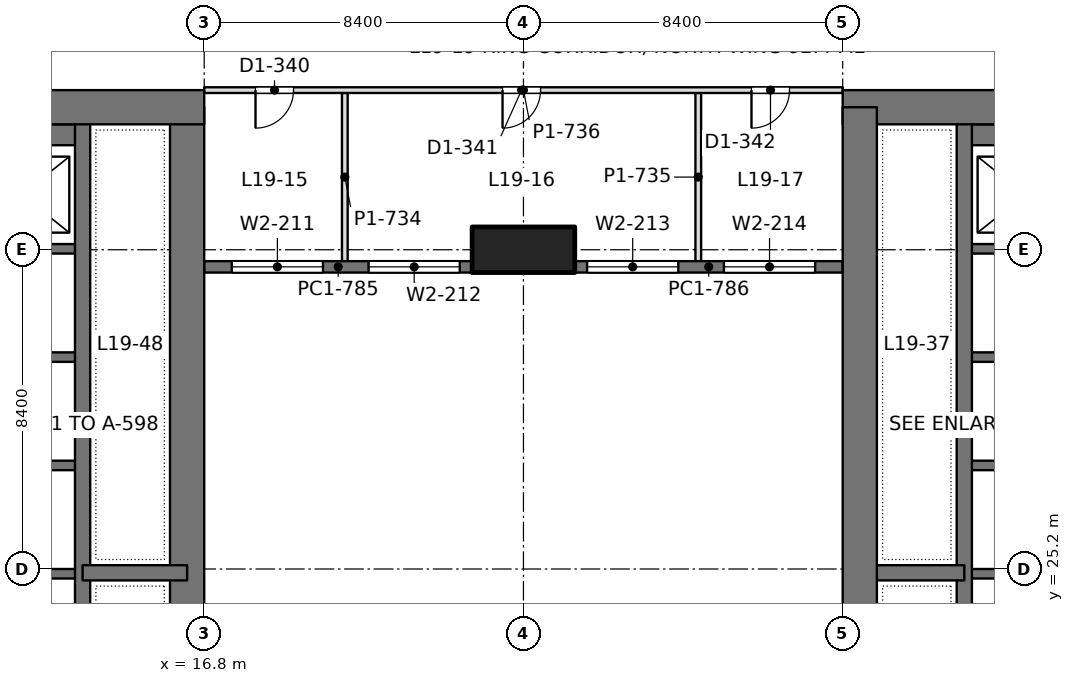
"""IFC4 building model, lengths in metres.
Left out: names, types, materials, properties, quantities, classifications, styles, units other than length and angle.
Written with IfcOpenShell. Run it as: python <this file> out.ifc"""

import sys

from ifc_helpers import new_model, si_unit, direction, frame, frame_2d, origin, origin_2d, place, context, subcontext, project, spatial, rectangle, extrude, element, fill, save


model = new_model("IFC4")
c1 = context("Model", 3, precision=1e-05, world=origin(), true_north=direction((0.0, 1.0)))
c2 = subcontext(c1, "Body", "Model", "MODEL_VIEW")
j1 = project(units=[si_unit("LENGTHUNIT", "METRE"), si_unit("PLANEANGLEUNIT", "RADIAN")], contexts=[c1])
p1 = place(None, origin())
s1 = spatial("IfcSite", under=j1, at=p1, CompositionType="ELEMENT")
p2 = place(p1, origin())
s2 = spatial("IfcBuilding", under=s1, at=p2, CompositionType="ELEMENT")
p3 = place(p2, frame((0.0, 0.0, 86.4)))
s3 = spatial("IfcBuildingStorey", under=s2, at=p3, CompositionType="ELEMENT", Elevation=86.4)
p4 = place(p3, frame((25.2, 33.6, 0.0), z_axis=(0.0, 0.0, 1.0), x_axis=(1.0, 0.0, 0.0)))
e1 = element("IfcColumn", 1, at=p4, inside=s3, PredefinedType="COLUMN", context=c2, shape_type="SweptSolid", body=[
    extrude(rectangle(XDim=2.7, YDim=1.2, at=origin_2d()), origin(), (0.0, 0.0, 1.0), 4.5),
])
p5 = place(p3, frame((-1.2, 37.35, 0.0), z_axis=(0.0, 0.0, 1.0), x_axis=(1.0, 0.0, 0.0)))
e2 = element("IfcWall", 2, at=p5, inside=s3, PredefinedType="SHEAR", context=c2, shape_type="SweptSolid", body=[
    extrude(rectangle(XDim=18.0, YDim=0.9, at=frame_2d((9.0, 0.0))), origin(), (0.0, 0.0, 1.0), 4.5),
])
p6 = place(p5, frame((8.95, 0.0, 0.0)))
e3 = element("IfcOpeningElement", 3, at=p6, cuts=e2, PredefinedType="OPENING", context=c2, shape_type="SweptSolid", body=[
    extrude(rectangle(XDim=1.8, YDim=2.4, at=frame_2d((0.9, 1.2))), frame((0.0, 0.46, 0.0), z_axis=(0.0, -1.0, 0.0), x_axis=(1.0, 0.0, 0.0)), (0.0, 0.0, 1.0), 0.92),
])
p7 = place(p3, frame((16.35, 13.05, 0.0), z_axis=(0.0, 0.0, 1.0), x_axis=(0.0, 1.0, 0.0)))
e4 = element("IfcWall", 4, at=p7, inside=s3, PredefinedType="SHEAR", context=c2, shape_type="SweptSolid", body=[
    extrude(rectangle(XDim=24.3, YDim=0.9, at=frame_2d((12.15, 0.0))), origin(), (0.0, 0.0, 1.0), 4.5),
])
p8 = place(p3, frame((13.6, 13.05, 0.0), z_axis=(0.0, 0.0, 1.0), x_axis=(0.0, 1.0, 0.0)))
e5 = element("IfcWall", 5, at=p8, inside=s3, PredefinedType="SHEAR", context=c2, shape_type="SweptSolid", body=[
    extrude(rectangle(XDim=24.3, YDim=0.4, at=frame_2d((12.15, 0.0))), origin(), (0.0, 0.0, 1.0), 4.5),
])
p9 = place(p3, frame((13.6, 25.1, 0.0), z_axis=(0.0, 0.0, 1.0), x_axis=(1.0, 0.0, 0.0)))
e6 = element("IfcWall", 6, at=p9, inside=s3, PredefinedType="SHEAR", context=c2, shape_type="SweptSolid", body=[
    extrude(rectangle(XDim=2.75, YDim=0.4, at=frame_2d((1.375, 0.0))), origin(), (0.0, 0.0, 1.0), 4.5),
])
for number, where, z_axis, x_axis in (
    (7, (10.4, 25.075, 0.0), (0.0, 0.0, 1.0), (1.0, 0.0, 0.0)),
    (8, (10.4, 27.925, 0.0), (0.0, 0.0, 1.0), (1.0, 0.0, 0.0)),
    (9, (10.4, 30.775, 0.0), (0.0, 0.0, 1.0), (1.0, 0.0, 0.0)),
    (10, (10.4, 33.625, 0.0), (0.0, 0.0, 1.0), (1.0, 0.0, 0.0)),
):
    element("IfcWall", number, at=place(p3, frame(where, z_axis=z_axis, x_axis=x_axis)), inside=s3, PredefinedType="SHEAR", context=c2, shape_type="SweptSolid", body=[
        extrude(rectangle(XDim=3.2, YDim=0.25, at=frame_2d((1.6, 0.0))), origin(), (0.0, 0.0, 1.0), 4.5),
    ])
p10 = place(p3, frame((10.4, 36.625, 0.0), z_axis=(0.0, 0.0, 1.0), x_axis=(1.0, 0.0, 0.0)))
e11 = element("IfcWall", 11, at=p10, inside=s3, PredefinedType="SHEAR", context=c2, shape_type="SweptSolid", body=[
    extrude(rectangle(XDim=3.2, YDim=0.55, at=frame_2d((1.6, 0.0))), origin(), (0.0, 0.0, 1.0), 4.5),
])
p11 = place(p3, frame((33.6, 37.35, 0.0), z_axis=(0.0, 0.0, 1.0), x_axis=(1.0, 0.0, 0.0)))
e12 = element("IfcWall", 12, at=p11, inside=s3, PredefinedType="SHEAR", context=c2, shape_type="SweptSolid", body=[
    extrude(rectangle(XDim=18.0, YDim=0.9, at=frame_2d((9.0, 0.0))), origin(), (0.0, 0.0, 1.0), 4.5),
])
p12 = place(p11, frame((7.25, 0.0, 0.0)))
e13 = element("IfcOpeningElement", 13, at=p12, cuts=e12, PredefinedType="OPENING", context=c2, shape_type="SweptSolid", body=[
    extrude(rectangle(XDim=1.8, YDim=2.4, at=frame_2d((0.9, 1.2))), frame((0.0, 0.46, 0.0), z_axis=(0.0, -1.0, 0.0), x_axis=(1.0, 0.0, 0.0)), (0.0, 0.0, 1.0), 0.92),
])
p13 = place(p3, frame((34.05, 13.05, 0.0), z_axis=(0.0, 0.0, 1.0), x_axis=(0.0, 1.0, 0.0)))
e14 = element("IfcWall", 14, at=p13, inside=s3, PredefinedType="SHEAR", context=c2, shape_type="SweptSolid", body=[
    extrude(rectangle(XDim=24.3, YDim=0.9, at=frame_2d((12.15, 0.0))), origin(), (0.0, 0.0, 1.0), 4.5),
])
p14 = place(p3, frame((36.8, 13.05, 0.0), z_axis=(0.0, 0.0, 1.0), x_axis=(0.0, 1.0, 0.0)))
e15 = element("IfcWall", 15, at=p14, inside=s3, PredefinedType="SHEAR", context=c2, shape_type="SweptSolid", body=[
    extrude(rectangle(XDim=24.3, YDim=0.4, at=frame_2d((12.15, 0.0))), origin(), (0.0, 0.0, 1.0), 4.5),
])
p15 = place(p3, frame((36.8, 25.1, 0.0), z_axis=(0.0, 0.0, 1.0), x_axis=(-1.0, 0.0, 0.0)))
e16 = element("IfcWall", 16, at=p15, inside=s3, PredefinedType="SHEAR", context=c2, shape_type="SweptSolid", body=[
    extrude(rectangle(XDim=2.75, YDim=0.4, at=frame_2d((1.375, 0.0))), origin(), (0.0, 0.0, 1.0), 4.5),
])
for number, where, z_axis, x_axis in (
    (17, (40.0, 25.075, 0.0), (0.0, 0.0, 1.0), (-1.0, 0.0, 0.0)),
    (18, (40.0, 27.925, 0.0), (0.0, 0.0, 1.0), (-1.0, 0.0, 0.0)),
    (19, (40.0, 30.775, 0.0), (0.0, 0.0, 1.0), (-1.0, 0.0, 0.0)),
    (20, (40.0, 33.625, 0.0), (0.0, 0.0, 1.0), (-1.0, 0.0, 0.0)),
):
    element("IfcWall", number, at=place(p3, frame(where, z_axis=z_axis, x_axis=x_axis)), inside=s3, PredefinedType="SHEAR", context=c2, shape_type="SweptSolid", body=[
        extrude(rectangle(XDim=3.2, YDim=0.25, at=frame_2d((1.6, 0.0))), origin(), (0.0, 0.0, 1.0), 4.5),
    ])
p16 = place(p3, frame((40.0, 36.625, 0.0), z_axis=(0.0, 0.0, 1.0), x_axis=(-1.0, 0.0, 0.0)))
e21 = element("IfcWall", 21, at=p16, inside=s3, PredefinedType="SHEAR", context=c2, shape_type="SweptSolid", body=[
    extrude(rectangle(XDim=3.2, YDim=0.55, at=frame_2d((1.6, 0.0))), origin(), (0.0, 0.0, 1.0), 4.5),
])
p17 = place(p3, frame((16.8, 33.15, 0.0), z_axis=(0.0, 0.0, 1.0), x_axis=(1.0, 0.0, 0.0)))
e22 = element("IfcWall", 22, at=p17, inside=s3, PredefinedType="SOLIDWALL", context=c2, shape_type="SweptSolid", body=[
    extrude(rectangle(XDim=7.05, YDim=0.3, at=frame_2d((3.525, 0.0))), origin(), (0.0, 0.0, 1.0), 4.3),
])
p18 = place(p17, frame((0.725, 0.0, 0.9)))
e23 = element("IfcOpeningElement", 23, at=p18, cuts=e22, PredefinedType="OPENING", context=c2, shape_type="SweptSolid", body=[
    extrude(rectangle(XDim=2.4, YDim=1.9, at=frame_2d((1.2, 0.95))), frame((0.0, 0.16, 0.0), z_axis=(0.0, -1.0, 0.0), x_axis=(1.0, 0.0, 0.0)), (0.0, 0.0, 1.0), 0.32),
])
p19 = place(p17, frame((4.325, 0.0, 0.9)))
e24 = element("IfcOpeningElement", 24, at=p19, cuts=e22, PredefinedType="OPENING", context=c2, shape_type="SweptSolid", body=[
    extrude(rectangle(XDim=2.4, YDim=1.9, at=frame_2d((1.2, 0.95))), frame((0.0, 0.16, 0.0), z_axis=(0.0, -1.0, 0.0), x_axis=(1.0, 0.0, 0.0)), (0.0, 0.0, 1.0), 0.32),
])
p20 = place(p3, frame((26.55, 33.15, 0.0), z_axis=(0.0, 0.0, 1.0), x_axis=(1.0, 0.0, 0.0)))
e25 = element("IfcWall", 25, at=p20, inside=s3, PredefinedType="SOLIDWALL", context=c2, shape_type="SweptSolid", body=[
    extrude(rectangle(XDim=7.05, YDim=0.3, at=frame_2d((3.525, 0.0))), origin(), (0.0, 0.0, 1.0), 4.3),
])
p21 = place(p20, frame((0.325, 0.0, 0.9)))
e26 = element("IfcOpeningElement", 26, at=p21, cuts=e25, PredefinedType="OPENING", context=c2, shape_type="SweptSolid", body=[
    extrude(rectangle(XDim=2.4, YDim=1.9, at=frame_2d((1.2, 0.95))), frame((0.0, 0.16, 0.0), z_axis=(0.0, -1.0, 0.0), x_axis=(1.0, 0.0, 0.0)), (0.0, 0.0, 1.0), 0.32),
])
p22 = place(p20, frame((3.925, 0.0, 0.9)))
e27 = element("IfcOpeningElement", 27, at=p22, cuts=e25, PredefinedType="OPENING", context=c2, shape_type="SweptSolid", body=[
    extrude(rectangle(XDim=2.4, YDim=1.9, at=frame_2d((1.2, 0.95))), frame((0.0, 0.16, 0.0), z_axis=(0.0, -1.0, 0.0), x_axis=(1.0, 0.0, 0.0)), (0.0, 0.0, 1.0), 0.32),
])
for number, where, z_axis, x_axis in (
    (28, (20.5, 33.298, 0.0), (0.0, 0.0, 1.0), (0.0, 1.0, 0.0)),
    (29, (29.8, 33.298, 0.0), (0.0, 0.0, 1.0), (0.0, 1.0, 0.0)),
):
    element("IfcWall", number, at=place(p3, frame(where, z_axis=z_axis, x_axis=x_axis)), inside=s3, PredefinedType="PARTITIONING", context=c2, shape_type="SweptSolid", body=[
        extrude(rectangle(XDim=4.428, YDim=0.15, at=frame_2d((2.214, 0.0))), origin(), (0.0, 0.0, 1.0), 3.61),
    ])
p23 = place(p3, frame((16.798, 37.8, 0.0), z_axis=(0.0, 0.0, 1.0), x_axis=(1.0, 0.0, 0.0)))
e30 = element("IfcWall", 30, at=p23, inside=s3, PredefinedType="PARTITIONING", context=c2, shape_type="SweptSolid", body=[
    extrude(rectangle(XDim=16.804, YDim=0.15, at=frame_2d((8.402, 0.0))), origin(), (0.0, 0.0, 1.0), 3.6),
])
p24 = place(p23, frame((1.352, 0.0, 0.0)))
e31 = element("IfcOpeningElement", 31, at=p24, cuts=e30, PredefinedType="OPENING", context=c2, shape_type="SweptSolid", body=[
    extrude(rectangle(XDim=1.0, YDim=2.2, at=frame_2d((0.5, 1.1))), frame((0.0, 0.085, 0.0), z_axis=(0.0, -1.0, 0.0), x_axis=(1.0, 0.0, 0.0)), (0.0, 0.0, 1.0), 0.17),
])
p25 = place(p23, frame((7.852, 0.0, 0.0)))
e32 = element("IfcOpeningElement", 32, at=p25, cuts=e30, PredefinedType="OPENING", context=c2, shape_type="SweptSolid", body=[
    extrude(rectangle(XDim=1.0, YDim=2.2, at=frame_2d((0.5, 1.1))), frame((0.0, 0.085, 0.0), z_axis=(0.0, -1.0, 0.0), x_axis=(1.0, 0.0, 0.0)), (0.0, 0.0, 1.0), 0.17),
])
p26 = place(p23, frame((14.402, 0.0, 0.0)))
e33 = element("IfcOpeningElement", 33, at=p26, cuts=e30, PredefinedType="OPENING", context=c2, shape_type="SweptSolid", body=[
    extrude(rectangle(XDim=1.0, YDim=2.2, at=frame_2d((0.5, 1.1))), frame((0.0, 0.085, 0.0), z_axis=(0.0, -1.0, 0.0), x_axis=(1.0, 0.0, 0.0)), (0.0, 0.0, 1.0), 0.17),
])
p27 = place(p18, origin())
e34 = element("IfcWindow", 34, at=p27, inside=s3, PartitioningType="SINGLE_PANEL", PredefinedType="WINDOW", context=c2, shape_type="SweptSolid", body=[
    extrude(rectangle(XDim=2.4, YDim=1.9, at=frame_2d((1.2, 0.95))), frame((0.0, 0.03, 0.0), z_axis=(0.0, -1.0, 0.0), x_axis=(1.0, 0.0, 0.0)), (0.0, 0.0, 1.0), 0.06),
])
fill(e23, e34)
p28 = place(p19, origin())
e35 = element("IfcWindow", 35, at=p28, inside=s3, PartitioningType="SINGLE_PANEL", PredefinedType="WINDOW", context=c2, shape_type="SweptSolid", body=[
    extrude(rectangle(XDim=2.4, YDim=1.9, at=frame_2d((1.2, 0.95))), frame((0.0, 0.03, 0.0), z_axis=(0.0, -1.0, 0.0), x_axis=(1.0, 0.0, 0.0)), (0.0, 0.0, 1.0), 0.06),
])
fill(e24, e35)
p29 = place(p21, origin())
e36 = element("IfcWindow", 36, at=p29, inside=s3, PartitioningType="SINGLE_PANEL", PredefinedType="WINDOW", context=c2, shape_type="SweptSolid", body=[
    extrude(rectangle(XDim=2.4, YDim=1.9, at=frame_2d((1.2, 0.95))), frame((0.0, 0.03, 0.0), z_axis=(0.0, -1.0, 0.0), x_axis=(1.0, 0.0, 0.0)), (0.0, 0.0, 1.0), 0.06),
])
fill(e26, e36)
p30 = place(p22, origin())
e37 = element("IfcWindow", 37, at=p30, inside=s3, PartitioningType="SINGLE_PANEL", PredefinedType="WINDOW", context=c2, shape_type="SweptSolid", body=[
    extrude(rectangle(XDim=2.4, YDim=1.9, at=frame_2d((1.2, 0.95))), frame((0.0, 0.03, 0.0), z_axis=(0.0, -1.0, 0.0), x_axis=(1.0, 0.0, 0.0)), (0.0, 0.0, 1.0), 0.06),
])
fill(e27, e37)
p31 = place(p24, frame((1.0, 0.0, 0.0), z_axis=(0.0, 0.0, 1.0), x_axis=(-1.0, 0.0, 0.0)))
e38 = element("IfcDoor", 38, at=p31, inside=s3, OperationType="SINGLE_SWING_RIGHT", PredefinedType="DOOR", context=c2, shape_type="SweptSolid", body=[
    extrude(rectangle(XDim=1.0, YDim=2.2, at=frame_2d((0.5, 1.1))), frame((0.0, 0.025, 0.0), z_axis=(0.0, -1.0, 0.0), x_axis=(1.0, 0.0, 0.0)), (0.0, 0.0, 1.0), 0.05),
])
fill(e31, e38)
p32 = place(p25, frame((1.0, 0.0, 0.0), z_axis=(0.0, 0.0, 1.0), x_axis=(-1.0, 0.0, 0.0)))
e39 = element("IfcDoor", 39, at=p32, inside=s3, OperationType="SINGLE_SWING_RIGHT", PredefinedType="DOOR", context=c2, shape_type="SweptSolid", body=[
    extrude(rectangle(XDim=1.0, YDim=2.2, at=frame_2d((0.5, 1.1))), frame((0.0, 0.025, 0.0), z_axis=(0.0, -1.0, 0.0), x_axis=(1.0, 0.0, 0.0)), (0.0, 0.0, 1.0), 0.05),
])
fill(e32, e39)
p33 = place(p26, frame((1.0, 0.0, 0.0), z_axis=(0.0, 0.0, 1.0), x_axis=(-1.0, 0.0, 0.0)))
e40 = element("IfcDoor", 40, at=p33, inside=s3, OperationType="SINGLE_SWING_RIGHT", PredefinedType="DOOR", context=c2, shape_type="SweptSolid", body=[
    extrude(rectangle(XDim=1.0, YDim=2.2, at=frame_2d((0.5, 1.1))), frame((0.0, 0.025, 0.0), z_axis=(0.0, -1.0, 0.0), x_axis=(1.0, 0.0, 0.0)), (0.0, 0.0, 1.0), 0.05),
])
fill(e33, e40)
save(model, sys.argv[1])
